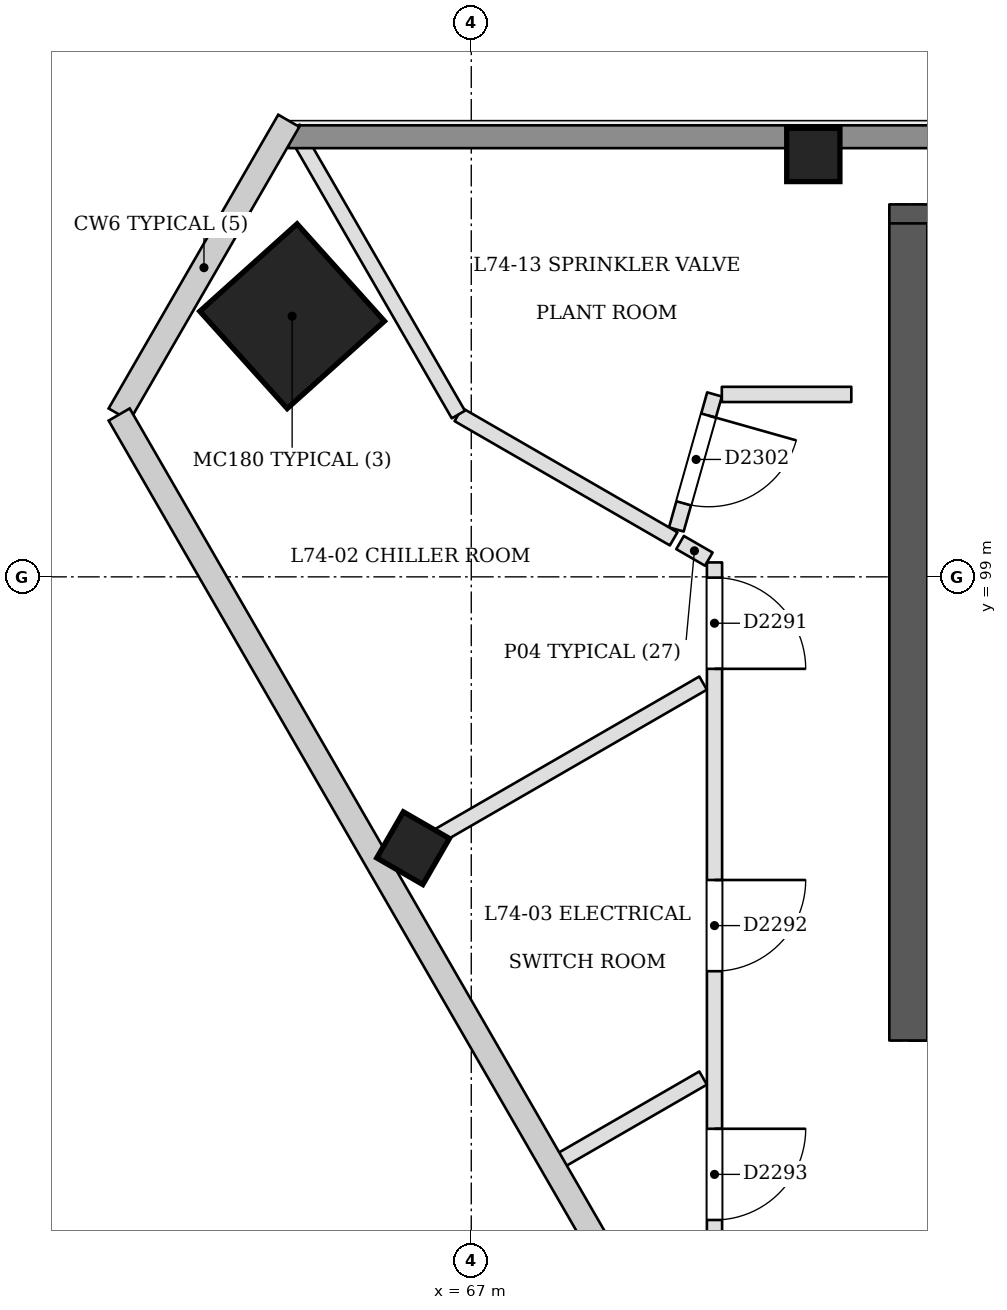
"""IFC4 building model, lengths in metres.
Left out: names, types, materials, properties, quantities, classifications, styles, units other than length and angle.
Written with IfcOpenShell. Run it as: python <this file> out.ifc"""

import sys

from ifc_helpers import new_model, si_unit, direction, frame, frame_2d, origin, origin_2d, place, context, subcontext, project, spatial, rectangle, extrude, element, fill, save


model = new_model("IFC4")
c1 = context("Model", 3, precision=1e-05, world=origin(), true_north=direction((0.0, 1.0)))
c2 = subcontext(c1, "Body", "Model", "MODEL_VIEW")
j1 = project(units=[si_unit("LENGTHUNIT", "METRE"), si_unit("PLANEANGLEUNIT", "RADIAN")], contexts=[c1])
p1 = place(None, origin())
s1 = spatial("IfcSite", under=j1, at=p1, CompositionType="ELEMENT")
p2 = place(p1, origin())
s2 = spatial("IfcBuilding", under=s1, at=p2, CompositionType="ELEMENT")
p3 = place(p2, frame((0.0, 0.0, 286.0)))
s3 = spatial("IfcBuildingStorey", under=s2, at=p3, CompositionType="ELEMENT", Elevation=286.0)
p4 = place(p3, frame((72.75, 93.15, 0.0), z_axis=(0.0, 0.0, 1.0), x_axis=(1.0, 0.0, 0.0)))
e1 = element("IfcWall", 1, at=p4, inside=s3, PredefinedType="SHEAR", context=c2, shape_type="SweptSolid", body=[
    extrude(rectangle(XDim=24.75, YDim=0.5, at=frame_2d((12.375, 0.0))), origin(), (0.0, 0.0, 1.0), 5.4),
])
p5 = place(p4, frame((1.05, 0.0, 0.0)))
e2 = element("IfcOpeningElement", 2, at=p5, cuts=e1, PredefinedType="OPENING", context=c2, shape_type="SweptSolid", body=[
    extrude(rectangle(XDim=1.2, YDim=2.1, at=frame_2d((0.6, 1.05))), frame((0.0, 0.26, 0.0), z_axis=(0.0, -1.0, 0.0), x_axis=(1.0, 0.0, 0.0)), (0.0, 0.0, 1.0), 0.521),
])
p6 = place(p4, frame((3.25, 0.0, 0.0)))
e3 = element("IfcOpeningElement", 3, at=p6, cuts=e1, PredefinedType="OPENING", context=c2, shape_type="SweptSolid", body=[
    extrude(rectangle(XDim=1.2, YDim=2.1, at=frame_2d((0.6, 1.05))), frame((0.0, 0.26, 0.0), z_axis=(0.0, -1.0, 0.0), x_axis=(1.0, 0.0, 0.0)), (0.0, 0.0, 1.0), 0.521),
])
p7 = place(p4, frame((13.25, 0.0, 0.0)))
e4 = element("IfcOpeningElement", 4, at=p7, cuts=e1, PredefinedType="OPENING", context=c2, shape_type="SweptSolid", body=[
    extrude(rectangle(XDim=1.2, YDim=2.1, at=frame_2d((0.6, 1.05))), frame((0.0, 0.26, 0.0), z_axis=(0.0, -1.0, 0.0), x_axis=(1.0, 0.0, 0.0)), (0.0, 0.0, 1.0), 0.521),
])
p8 = place(p4, frame((21.55, 0.0, 0.0)))
e5 = element("IfcOpeningElement", 5, at=p8, cuts=e1, PredefinedType="OPENING", context=c2, shape_type="SweptSolid", body=[
    extrude(rectangle(XDim=1.2, YDim=2.1, at=frame_2d((0.6, 1.05))), frame((0.0, 0.26, 0.0), z_axis=(0.0, -1.0, 0.0), x_axis=(1.0, 0.0, 0.0)), (0.0, 0.0, 1.0), 0.521),
])
p9 = place(p3, frame((97.25, 103.65, 0.0), z_axis=(0.0, 0.0, 1.0), x_axis=(-1.0, 0.0, 0.0)))
e6 = element("IfcWall", 6, at=p9, inside=s3, PredefinedType="SHEAR", context=c2, shape_type="SweptSolid", body=[
    extrude(rectangle(XDim=24.75, YDim=0.5, at=frame_2d((12.375, 0.0))), origin(), (0.0, 0.0, 1.0), 5.4),
])
p10 = place(p3, frame((72.75, 103.65, 0.0), z_axis=(0.0, 0.0, 1.0), x_axis=(0.0, -1.0, 0.0)))
e7 = element("IfcWall", 7, at=p10, inside=s3, PredefinedType="SHEAR", context=c2, shape_type="SweptSolid", body=[
    extrude(rectangle(XDim=10.75, YDim=0.5, at=frame_2d((5.375, 0.0))), origin(), (0.0, 0.0, 1.0), 5.4),
])
p11 = place(p3, frame((64.609, 102.418, 0.0), z_axis=(0.028425663377, 0.009264325902, 0.999552977049), x_axis=(-0.865723772845, 0.500122957611, 0.019984403961)))
e8 = element("IfcColumn", 8, at=p11, inside=s3, PredefinedType="COLUMN", context=c2, shape_type="SweptSolid", body=[
    extrude(rectangle(XDim=1.72, YDim=1.72, at=origin_2d()), origin(), (0.0, 0.0, 1.0), 5.402),
])
p12 = place(p3, frame((71.5, 104.55, 0.0), z_axis=(0.0, 0.0, 1.0), x_axis=(1.0, 0.0, 0.0)))
e9 = element("IfcColumn", 9, at=p12, inside=s3, PredefinedType="COLUMN", context=c2, shape_type="SweptSolid", body=[
    extrude(rectangle(XDim=0.7, YDim=0.7, at=origin_2d()), origin(), (0.0, 0.0, 1.0), 5.4),
])
p13 = place(p3, frame((66.208, 95.384, 0.0), z_axis=(0.02217724499, 0.038437546816, 0.999014877166), x_axis=(-0.865453806352, -0.499512508445, 0.038431276047)))
e10 = element("IfcColumn", 10, at=p13, inside=s3, PredefinedType="COLUMN", context=c2, shape_type="SweptSolid", body=[
    extrude(rectangle(XDim=0.7, YDim=0.7, at=origin_2d()), origin(), (0.0, 0.0, 1.0), 5.405),
])
p14 = place(p3, frame((69.747, 99.451, 0.0), z_axis=(0.0, 0.0, 1.0), x_axis=(0.866101796549, -0.4998676605, 0.0)))
e11 = element("IfcWall", 11, at=p14, inside=s3, PredefinedType="PARTITIONING", context=c2, shape_type="SweptSolid", body=[
    extrude(rectangle(XDim=0.437, YDim=0.2, at=frame_2d((0.218, 0.0))), origin(), (0.0, 0.0, 1.0), 5.0),
])
p15 = place(p3, frame((70.2, 99.19, 0.0), z_axis=(0.0, 0.0, 1.0), x_axis=(0.0, -1.0, 0.0)))
e12 = element("IfcWall", 12, at=p15, inside=s3, PredefinedType="PARTITIONING", context=c2, shape_type="SweptSolid", body=[
    extrude(rectangle(XDim=8.99, YDim=0.2, at=frame_2d((4.495, 0.0))), origin(), (0.0, 0.0, 1.0), 5.0),
])
p16 = place(p15, frame((0.2, 0.0, 0.0)))
e13 = element("IfcOpeningElement", 13, at=p16, cuts=e12, PredefinedType="OPENING", context=c2, shape_type="SweptSolid", body=[
    extrude(rectangle(XDim=1.2, YDim=2.4, at=frame_2d((0.6, 1.2))), frame((0.0, 0.11, 0.0), z_axis=(0.0, -1.0, 0.0), x_axis=(1.0, 0.0, 0.0)), (0.0, 0.0, 1.0), 0.221),
])
p17 = place(p15, frame((4.178, 0.0, 0.0)))
e14 = element("IfcOpeningElement", 14, at=p17, cuts=e12, PredefinedType="OPENING", context=c2, shape_type="SweptSolid", body=[
    extrude(rectangle(XDim=1.2, YDim=2.4, at=frame_2d((0.6, 1.2))), frame((0.0, 0.11, 0.0), z_axis=(0.0, -1.0, 0.0), x_axis=(1.0, 0.0, 0.0)), (0.0, 0.0, 1.0), 0.221),
])
p18 = place(p15, frame((7.451, 0.0, 0.0)))
e15 = element("IfcOpeningElement", 15, at=p18, cuts=e12, PredefinedType="OPENING", context=c2, shape_type="SweptSolid", body=[
    extrude(rectangle(XDim=1.2, YDim=2.4, at=frame_2d((0.6, 1.2))), frame((0.0, 0.11, 0.0), z_axis=(0.0, -1.0, 0.0), x_axis=(1.0, 0.0, 0.0)), (0.0, 0.0, 1.0), 0.221),
])
p19 = place(p3, frame((72.0, 101.4, 0.0), z_axis=(0.0, 0.0, 1.0), x_axis=(-1.0, 0.0, 0.0)))
e16 = element("IfcWall", 16, at=p19, inside=s3, PredefinedType="PARTITIONING", context=c2, shape_type="SweptSolid", body=[
    extrude(rectangle(XDim=1.704, YDim=0.2, at=frame_2d((0.852, 0.0))), origin(), (0.0, 0.0, 1.0), 5.0),
])
p20 = place(p3, frame((70.2, 101.4, 0.0), z_axis=(0.0, 0.0, 1.0), x_axis=(-0.27204752746, -0.962283816139, 0.0)))
e17 = element("IfcWall", 17, at=p20, inside=s3, PredefinedType="PARTITIONING", context=c2, shape_type="SweptSolid", body=[
    extrude(rectangle(XDim=1.846, YDim=0.2, at=frame_2d((0.923, 0.0))), origin(), (0.0, 0.0, 1.0), 5.0),
])
p21 = place(p20, frame((0.289, 0.0, 0.0)))
e18 = element("IfcOpeningElement", 18, at=p21, cuts=e17, PredefinedType="OPENING", context=c2, shape_type="SweptSolid", body=[
    extrude(rectangle(XDim=1.2, YDim=2.4, at=frame_2d((0.6, 1.2))), frame((0.0, 0.11, 0.0), z_axis=(0.0, -1.0, 0.0), x_axis=(1.0, 0.0, 0.0)), (0.0, 0.0, 1.0), 0.221),
])
p22 = place(p3, frame((65.905, 95.209, 0.0), z_axis=(0.0, 0.0, 1.0), x_axis=(0.86604373993, 0.499968239519, 0.0)))
e19 = element("IfcWall", 19, at=p22, inside=s3, PredefinedType="PARTITIONING", context=c2, shape_type="SweptSolid", body=[
    extrude(rectangle(XDim=4.786, YDim=0.2, at=frame_2d((2.393, 0.0))), origin(), (0.0, 0.0, 1.0), 5.0),
])
p23 = place(p3, frame((69.663, 99.5, 0.0), z_axis=(0.0, 0.0, 1.0), x_axis=(-0.866006586452, 0.50003259116, 0.0)))
e20 = element("IfcWall", 20, at=p23, inside=s3, PredefinedType="PARTITIONING", context=c2, shape_type="SweptSolid", body=[
    extrude(rectangle(XDim=3.271, YDim=0.2, at=frame_2d((1.635, 0.0))), origin(), (0.0, 0.0, 1.0), 5.0),
])
p24 = place(p3, frame((66.83, 101.135, 0.0), z_axis=(0.0, 0.0, 1.0), x_axis=(-0.500035223315, 0.866005066639, 0.0)))
e21 = element("IfcWall", 21, at=p24, inside=s3, PredefinedType="PARTITIONING", context=c2, shape_type="SweptSolid", body=[
    extrude(rectangle(XDim=4.347, YDim=0.2, at=frame_2d((2.173, 0.0))), origin(), (0.0, 0.0, 1.0), 5.0),
])
p25 = place(p3, frame((68.155, 91.312, 0.0), z_axis=(0.0, 0.0, 1.0), x_axis=(0.86602396135, 0.500002498361, 0.0)))
e22 = element("IfcWall", 22, at=p25, inside=s3, PredefinedType="PARTITIONING", context=c2, shape_type="SweptSolid", body=[
    extrude(rectangle(XDim=2.188, YDim=0.2, at=frame_2d((1.094, 0.0))), origin(), (0.0, 0.0, 1.0), 5.0),
])
p26 = place(p3, frame((64.599, 104.79, 0.0), z_axis=(0.0, 0.0, 1.0), x_axis=(1.0, 0.0, 0.0)))
e23 = element("IfcWall", 23, at=p26, inside=s3, PredefinedType="SOLIDWALL", context=c2, shape_type="SweptSolid", body=[
    extrude(rectangle(XDim=40.802, YDim=0.3, at=frame_2d((20.401, 0.0))), origin(), (0.0, 0.0, 1.0), 5.0),
])
p27 = place(p16, origin())
e24 = element("IfcDoor", 24, at=p27, inside=s3, OperationType="SINGLE_SWING_RIGHT", PredefinedType="NOTDEFINED", context=c2, shape_type="SweptSolid", body=[
    extrude(rectangle(XDim=1.2, YDim=2.4, at=frame_2d((0.6, 1.2))), frame((0.0, 0.025, 0.0), z_axis=(0.0, -1.0, 0.0), x_axis=(1.0, 0.0, 0.0)), (0.0, 0.0, 1.0), 0.05),
])
fill(e13, e24)
p28 = place(p17, origin())
e25 = element("IfcDoor", 25, at=p28, inside=s3, OperationType="SINGLE_SWING_LEFT", PredefinedType="NOTDEFINED", context=c2, shape_type="SweptSolid", body=[
    extrude(rectangle(XDim=1.2, YDim=2.4, at=frame_2d((0.6, 1.2))), frame((0.0, 0.025, 0.0), z_axis=(0.0, -1.0, 0.0), x_axis=(1.0, 0.0, 0.0)), (0.0, 0.0, 1.0), 0.05),
])
fill(e14, e25)
p29 = place(p18, origin())
e26 = element("IfcDoor", 26, at=p29, inside=s3, OperationType="SINGLE_SWING_LEFT", PredefinedType="NOTDEFINED", context=c2, shape_type="SweptSolid", body=[
    extrude(rectangle(XDim=1.2, YDim=2.4, at=frame_2d((0.6, 1.2))), frame((0.0, 0.025, 0.0), z_axis=(0.0, -1.0, 0.0), x_axis=(1.0, 0.0, 0.0)), (0.0, 0.0, 1.0), 0.05),
])
fill(e15, e26)
p30 = place(p21, origin())
e27 = element("IfcDoor", 27, at=p30, inside=s3, OperationType="SINGLE_SWING_LEFT", PredefinedType="NOTDEFINED", context=c2, shape_type="SweptSolid", body=[
    extrude(rectangle(XDim=1.2, YDim=2.4, at=frame_2d((0.6, 1.2))), frame((0.0, 0.025, 0.0), z_axis=(0.0, -1.0, 0.0), x_axis=(1.0, 0.0, 0.0)), (0.0, 0.0, 1.0), 0.05),
])
fill(e18, e27)
save(model, sys.argv[1])
